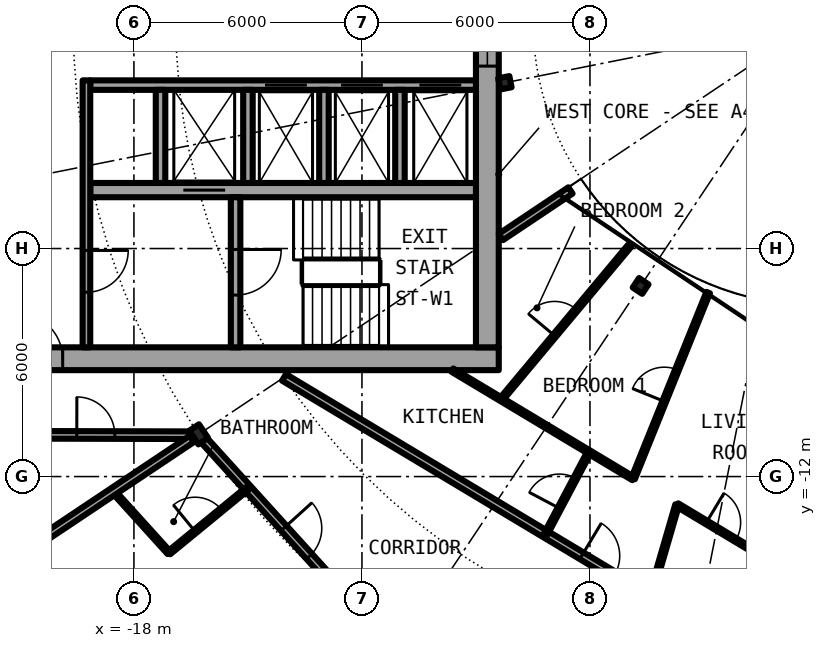
"""IFC4 building model, lengths in metres.
Left out: names, types, materials, properties, quantities, classifications, styles, units other than length and angle.
Written with IfcOpenShell. Run it as: python <this file> out.ifc"""

import sys

from ifc_helpers import new_model, si_unit, direction, frame, frame_2d, origin, origin_2d, place, context, subcontext, project, spatial, rectangle, i_section, extrude, element, fill, save


model = new_model("IFC4")
c1 = context("Model", 3, precision=1e-05, world=origin(), true_north=direction((0.0, 1.0)))
c2 = subcontext(c1, "Body", "Model", "MODEL_VIEW")
j1 = project(units=[si_unit("LENGTHUNIT", "METRE"), si_unit("PLANEANGLEUNIT", "RADIAN")], contexts=[c1])
p1 = place(None, origin())
s1 = spatial("IfcSite", under=j1, at=p1, CompositionType="ELEMENT")
p2 = place(p1, origin())
s2 = spatial("IfcBuilding", under=s1, at=p2, CompositionType="ELEMENT")
p3 = place(p2, frame((0.0, 0.0, 117.75)))
s3 = spatial("IfcBuildingStorey", under=s2, at=p3, CompositionType="ELEMENT", Elevation=117.75)
p4 = place(p3, frame((-16.297, -10.889, 0.0), z_axis=(0.0, 0.0, 1.0), x_axis=(-0.831469612303, -0.55557023302, 0.0)))
e1 = element("IfcColumn", 1, at=p4, inside=s3, PredefinedType="COLUMN", context=c2, shape_type="SweptSolid", body=[
    extrude(i_section(OverallWidth=0.307, OverallDepth=0.432, WebThickness=0.021, FlangeThickness=0.04, FilletRadius=0.027, at=origin_2d()), origin(), (0.0, 0.0, 1.0), 3.05),
])
for number, where, z_axis, x_axis in (
    (2, (-8.239, -1.639, 0.0), (0.0, 0.0, 1.0), (-0.981, -0.195, 0.0)),
    (3, (-4.667, -6.984, 0.0), (0.0, 0.0, 1.0), (-0.556, -0.831, 0.0)),
):
    element("IfcColumn", number, at=place(p3, frame(where, z_axis=z_axis, x_axis=x_axis)), inside=s3, PredefinedType="COLUMN", context=c2, shape_type="SweptSolid", body=[
        extrude(i_section(OverallWidth=0.3, OverallDepth=0.3, WebThickness=0.011, FlangeThickness=0.019, FilletRadius=0.027, at=origin_2d()), origin(), (0.0, 0.0, 1.0), 3.05),
    ])
p5 = place(p3, frame((-22.2, -8.9, 0.0), z_axis=(0.0, 0.0, 1.0), x_axis=(1.0, 0.0, 0.0)))
e4 = element("IfcWall", 4, at=p5, inside=s3, PredefinedType="SHEAR", context=c2, shape_type="SweptSolid", body=[
    extrude(rectangle(XDim=13.8, YDim=0.6, at=frame_2d((6.9, 0.0))), origin(), (0.0, 0.0, 1.0), 3.05),
])
p6 = place(p5, frame((1.125, 0.0, 0.0)))
e5 = element("IfcOpeningElement", 5, at=p6, cuts=e4, PredefinedType="OPENING", context=c2, shape_type="SweptSolid", body=[
    extrude(rectangle(XDim=1.2, YDim=2.3, at=frame_2d((0.6, 1.15))), frame((0.0, 0.31, 0.0), z_axis=(0.0, -1.0, 0.0), x_axis=(1.0, 0.0, 0.0)), (0.0, 0.0, 1.0), 0.62),
])
p7 = place(p3, frame((-8.7, 8.6, 0.0), z_axis=(0.0, 0.0, 1.0), x_axis=(0.0, -1.0, 0.0)))
e6 = element("IfcWall", 6, at=p7, inside=s3, PredefinedType="SHEAR", context=c2, shape_type="SweptSolid", body=[
    extrude(rectangle(XDim=17.2, YDim=0.6, at=frame_2d((8.6, 0.0))), origin(), (0.0, 0.0, 1.0), 3.05),
])
p8 = place(p7, frame((7.4, 0.0, 0.1)))
e7 = element("IfcOpeningElement", 7, at=p8, cuts=e6, PredefinedType="OPENING", context=c2, shape_type="SweptSolid", body=[
    extrude(rectangle(XDim=2.4, YDim=2.2, at=frame_2d((1.2, 1.1))), frame((0.0, 0.31, 0.0), z_axis=(0.0, -1.0, 0.0), x_axis=(1.0, 0.0, 0.0)), (0.0, 0.0, 1.0), 0.62),
])
p9 = place(p3, frame((-9.0, -1.7, 0.0), z_axis=(0.0, 0.0, 1.0), x_axis=(-1.0, 0.0, 0.0)))
e8 = element("IfcWall", 8, at=p9, inside=s3, PredefinedType="SHEAR", context=c2, shape_type="SweptSolid", body=[
    extrude(rectangle(XDim=10.15, YDim=0.25, at=frame_2d((5.075, 0.0))), origin(), (0.0, 0.0, 1.0), 3.05),
])
p10 = place(p9, frame((0.387, 0.0, 0.0)))
e9 = element("IfcOpeningElement", 9, at=p10, cuts=e8, PredefinedType="OPENING", context=c2, shape_type="SweptSolid", body=[
    extrude(rectangle(XDim=1.1, YDim=2.3, at=frame_2d((0.55, 1.15))), frame((0.0, 0.135, 0.0), z_axis=(0.0, -1.0, 0.0), x_axis=(1.0, 0.0, 0.0)), (0.0, 0.0, 1.0), 0.27),
])
p11 = place(p9, frame((2.45, 0.0, 0.0)))
e10 = element("IfcOpeningElement", 10, at=p11, cuts=e8, PredefinedType="OPENING", context=c2, shape_type="SweptSolid", body=[
    extrude(rectangle(XDim=1.1, YDim=2.3, at=frame_2d((0.55, 1.15))), frame((0.0, 0.135, 0.0), z_axis=(0.0, -1.0, 0.0), x_axis=(1.0, 0.0, 0.0)), (0.0, 0.0, 1.0), 0.27),
])
p12 = place(p9, frame((4.45, 0.0, 0.0)))
e11 = element("IfcOpeningElement", 11, at=p12, cuts=e8, PredefinedType="OPENING", context=c2, shape_type="SweptSolid", body=[
    extrude(rectangle(XDim=1.1, YDim=2.3, at=frame_2d((0.55, 1.15))), frame((0.0, 0.135, 0.0), z_axis=(0.0, -1.0, 0.0), x_axis=(1.0, 0.0, 0.0)), (0.0, 0.0, 1.0), 0.27),
])
p13 = place(p3, frame((-9.0, -4.462, 0.0), z_axis=(0.0, 0.0, 1.0), x_axis=(-1.0, 0.0, 0.0)))
e12 = element("IfcWall", 12, at=p13, inside=s3, PredefinedType="SHEAR", context=c2, shape_type="SweptSolid", body=[
    extrude(rectangle(XDim=10.15, YDim=0.375, at=frame_2d((5.075, 0.0))), origin(), (0.0, 0.0, 1.0), 3.05),
])
p14 = place(p13, frame((6.6, 0.0, 0.0)))
e13 = element("IfcOpeningElement", 13, at=p14, cuts=e12, PredefinedType="OPENING", context=c2, shape_type="SweptSolid", body=[
    extrude(rectangle(XDim=1.1, YDim=2.3, at=frame_2d((0.55, 1.15))), frame((0.0, 0.198, 0.0), z_axis=(0.0, -1.0, 0.0), x_axis=(1.0, 0.0, 0.0)), (0.0, 0.0, 1.0), 0.395),
])
p15 = place(p3, frame((-15.325, -4.65, 0.0), z_axis=(0.0, 0.0, 1.0), x_axis=(0.0, -1.0, 0.0)))
e14 = element("IfcWall", 14, at=p15, inside=s3, PredefinedType="SHEAR", context=c2, shape_type="SweptSolid", body=[
    extrude(rectangle(XDim=3.95, YDim=0.25, at=frame_2d((1.975, 0.0))), origin(), (0.0, 0.0, 1.0), 3.05),
])
p16 = place(p15, frame((1.375, 0.0, 0.0)))
e15 = element("IfcOpeningElement", 15, at=p16, cuts=e14, PredefinedType="OPENING", context=c2, shape_type="SweptSolid", body=[
    extrude(rectangle(XDim=1.2, YDim=2.3, at=frame_2d((0.6, 1.15))), frame((0.0, 0.135, 0.0), z_axis=(0.0, -1.0, 0.0), x_axis=(1.0, 0.0, 0.0)), (0.0, 0.0, 1.0), 0.27),
])
for number, where, z_axis, x_axis in (
    (16, (-15.0, -1.825, 0.0), (0.0, 0.0, 1.0), (0.0, -1.0, 0.0)),
    (17, (-17.3, -1.825, 0.0), (0.0, 0.0, 1.0), (0.0, -1.0, 0.0)),
):
    element("IfcWall", number, at=place(p3, frame(where, z_axis=z_axis, x_axis=x_axis)), inside=s3, PredefinedType="SOLIDWALL", context=c2, shape_type="SweptSolid", body=[
        extrude(rectangle(XDim=2.45, YDim=0.25, at=frame_2d((1.225, 0.0))), origin(), (0.0, 0.0, 1.0), 2.7),
    ])
p17 = place(p3, frame((-19.25, -1.575, 0.0), z_axis=(0.0, 0.0, 1.0), x_axis=(0.0, -1.0, 0.0)))
e18 = element("IfcWall", 18, at=p17, inside=s3, PredefinedType="SOLIDWALL", context=c2, shape_type="SweptSolid", body=[
    extrude(rectangle(XDim=7.025, YDim=0.2, at=frame_2d((3.513, 0.0))), origin(), (0.0, 0.0, 1.0), 2.7),
])
p18 = place(p17, frame((4.475, 0.0, 0.0)))
e19 = element("IfcOpeningElement", 19, at=p18, cuts=e18, PredefinedType="OPENING", context=c2, shape_type="SweptSolid", body=[
    extrude(rectangle(XDim=1.1, YDim=2.3, at=frame_2d((0.55, 1.15))), frame((0.0, 0.11, 0.0), z_axis=(0.0, -1.0, 0.0), x_axis=(1.0, 0.0, 0.0)), (0.0, 0.0, 1.0), 0.22),
])
for number, where, z_axis, x_axis in (
    (20, (-11.0, -1.825, 0.0), (0.0, 0.0, 1.0), (0.0, -1.0, 0.0)),
    (21, (-13.0, -1.825, 0.0), (0.0, 0.0, 1.0), (0.0, -1.0, 0.0)),
):
    element("IfcWall", number, at=place(p3, frame(where, z_axis=z_axis, x_axis=x_axis)), inside=s3, PredefinedType="SOLIDWALL", context=c2, shape_type="SweptSolid", body=[
        extrude(rectangle(XDim=2.45, YDim=0.25, at=frame_2d((1.225, 0.0))), origin(), (0.0, 0.0, 1.0), 2.7),
    ])
p19 = place(p3, frame((-18.542, -12.389, 0.0), z_axis=(0.0, 0.0, 1.0), x_axis=(0.671396556615, -0.741098282123, 0.0)))
e22 = element("IfcWall", 22, at=p19, inside=s3, PredefinedType="PARTITIONING", context=c2, shape_type="SweptSolid", body=[
    extrude(rectangle(XDim=2.182, YDim=0.1, at=frame_2d((1.091, 0.0))), origin(), (0.0, 0.0, 1.0), 2.7),
])
p20 = place(p3, frame((-16.192, -11.004, 0.0), z_axis=(0.0, 0.0, 1.0), x_axis=(0.671481997275, -0.741020868354, 0.0)))
e23 = element("IfcWall", 23, at=p20, inside=s3, PredefinedType="PARTITIONING", context=c2, shape_type="SweptSolid", body=[
    extrude(rectangle(XDim=5.596, YDim=0.2, at=frame_2d((2.798, 0.0))), origin(), (0.0, 0.0, 1.0), 2.39),
])
p21 = place(p20, frame((3.179, 0.0, 0.0)))
e24 = element("IfcOpeningElement", 24, at=p21, cuts=e23, PredefinedType="OPENING", context=c2, shape_type="SweptSolid", body=[
    extrude(rectangle(XDim=1.0, YDim=2.3, at=frame_2d((0.5, 1.15))), frame((0.0, 0.11, 0.0), z_axis=(0.0, -1.0, 0.0), x_axis=(1.0, 0.0, 0.0)), (0.0, 0.0, 1.0), 0.22),
])
p22 = place(p3, frame((-14.051, -9.391, 0.0), z_axis=(0.0, 0.0, 1.0), x_axis=(0.857768591583, -0.514036033069, 0.0)))
e25 = element("IfcWall", 25, at=p22, inside=s3, PredefinedType="PARTITIONING", context=c2, shape_type="SweptSolid", body=[
    extrude(rectangle(XDim=14.45, YDim=0.2, at=frame_2d((7.225, 0.0))), origin(), (0.0, 0.0, 1.0), 2.7),
])
p23 = place(p22, frame((9.133, 0.0, 0.0)))
e26 = element("IfcOpeningElement", 26, at=p23, cuts=e25, PredefinedType="OPENING", context=c2, shape_type="SweptSolid", body=[
    extrude(rectangle(XDim=1.0, YDim=2.3, at=frame_2d((0.5, 1.15))), frame((0.0, 0.11, 0.0), z_axis=(0.0, -1.0, 0.0), x_axis=(1.0, 0.0, 0.0)), (0.0, 0.0, 1.0), 0.22),
])
p24 = place(p3, frame((-9.621, -9.199, 0.0), z_axis=(0.0, 0.0, 1.0), x_axis=(0.857698539053, -0.514152911211, 0.0)))
e27 = element("IfcWall", 27, at=p24, inside=s3, PredefinedType="PARTITIONING", context=c2, shape_type="SweptSolid", body=[
    extrude(rectangle(XDim=5.551, YDim=0.1, at=frame_2d((2.775, 0.0))), origin(), (0.0, 0.0, 1.0), 2.7),
])
p25 = place(p3, frame((-3.702, -12.747, 0.0), z_axis=(0.0, 0.0, 1.0), x_axis=(0.85772440305, -0.514109763001, 0.0)))
e28 = element("IfcWall", 28, at=p25, inside=s3, PredefinedType="PARTITIONING", context=c2, shape_type="SweptSolid", body=[
    extrude(rectangle(XDim=2.698, YDim=0.1, at=frame_2d((1.349, 0.0))), origin(), (0.0, 0.0, 1.0), 2.7),
])
p26 = place(p25, frame((0.894, 0.0, 0.0)))
e29 = element("IfcOpeningElement", 29, at=p26, cuts=e28, PredefinedType="OPENING", context=c2, shape_type="SweptSolid", body=[
    extrude(rectangle(XDim=0.9, YDim=2.3, at=frame_2d((0.45, 1.15))), frame((0.0, 0.06, 0.0), z_axis=(0.0, -1.0, 0.0), x_axis=(1.0, 0.0, 0.0)), (0.0, 0.0, 1.0), 0.12),
])
p27 = place(p3, frame((-21.675, -10.9, 0.0), z_axis=(0.0, 0.0, 1.0), x_axis=(0.999997173357, -0.002377662213, 0.0)))
e30 = element("IfcWall", 30, at=p27, inside=s3, PredefinedType="PARTITIONING", context=c2, shape_type="SweptSolid", body=[
    extrude(rectangle(XDim=5.134, YDim=0.2, at=frame_2d((2.567, 0.0))), origin(), (0.0, 0.0, 1.0), 2.7),
])
p28 = place(p27, frame((2.171, 0.0, 0.0)))
e31 = element("IfcOpeningElement", 31, at=p28, cuts=e30, PredefinedType="OPENING", context=c2, shape_type="SweptSolid", body=[
    extrude(rectangle(XDim=1.0, YDim=2.3, at=frame_2d((0.5, 1.15))), frame((0.0, 0.11, 0.0), z_axis=(0.0, -1.0, 0.0), x_axis=(1.0, 0.0, 0.0)), (0.0, 0.0, 1.0), 0.22),
])
p29 = place(p3, frame((-6.513, -4.472, 0.0), z_axis=(0.0, 0.0, 1.0), x_axis=(-0.831333375071, -0.555774072347, 0.0)))
e32 = element("IfcWall", 32, at=p29, inside=s3, PredefinedType="PARTITIONING", context=c2, shape_type="SweptSolid", body=[
    extrude(rectangle(XDim=2.203, YDim=0.2, at=frame_2d((1.101, 0.0))), origin(), (0.0, 0.0, 1.0), 2.7),
])
p30 = place(p3, frame((-22.595, -15.097, 0.0), z_axis=(0.0, 0.0, 1.0), x_axis=(0.831467903109, 0.555572791, 0.0)))
e33 = element("IfcWall", 33, at=p30, inside=s3, PredefinedType="PARTITIONING", context=c2, shape_type="SweptSolid", body=[
    extrude(rectangle(XDim=7.358, YDim=0.2, at=frame_2d((3.679, 0.0))), origin(), (0.0, 0.0, 1.0), 2.7),
])
p31 = place(p3, frame((-17.077, -14.006, 0.0), z_axis=(0.0, 0.0, 1.0), x_axis=(0.77319617123, 0.634166918717, 0.0)))
e34 = element("IfcWall", 34, at=p31, inside=s3, PredefinedType="PARTITIONING", context=c2, shape_type="SweptSolid", body=[
    extrude(rectangle(XDim=2.675, YDim=0.1, at=frame_2d((1.337, 0.0))), origin(), (0.0, 0.0, 1.0), 2.7),
])
p32 = place(p31, frame((0.887, 0.0, 0.0)))
e35 = element("IfcOpeningElement", 35, at=p32, cuts=e34, PredefinedType="OPENING", context=c2, shape_type="SweptSolid", body=[
    extrude(rectangle(XDim=0.9, YDim=2.3, at=frame_2d((0.45, 1.15))), frame((0.0, 0.06, 0.0), z_axis=(0.0, -1.0, 0.0), x_axis=(1.0, 0.0, 0.0)), (0.0, 0.0, 1.0), 0.12),
])
p33 = place(p3, frame((-8.335, -9.97, 0.0), z_axis=(0.0, 0.0, 1.0), x_axis=(0.641376424834, 0.767226356213, 0.0)))
e36 = element("IfcWall", 36, at=p33, inside=s3, PredefinedType="PARTITIONING", context=c2, shape_type="SweptSolid", body=[
    extrude(rectangle(XDim=5.275, YDim=0.1, at=frame_2d((2.637, 0.0))), origin(), (0.0, 0.0, 1.0), 2.7),
])
p34 = place(p33, frame((2.187, 0.0, 0.0)))
e37 = element("IfcOpeningElement", 37, at=p34, cuts=e36, PredefinedType="OPENING", context=c2, shape_type="SweptSolid", body=[
    extrude(rectangle(XDim=0.9, YDim=2.3, at=frame_2d((0.45, 1.15))), frame((0.0, 0.06, 0.0), z_axis=(0.0, -1.0, 0.0), x_axis=(1.0, 0.0, 0.0)), (0.0, 0.0, 1.0), 0.12),
])
p35 = place(p3, frame((-7.166, -13.517, 0.0), z_axis=(0.0, 0.0, 1.0), x_axis=(0.468337293896, 0.883549760425, 0.0)))
e38 = element("IfcWall", 38, at=p35, inside=s3, PredefinedType="PARTITIONING", context=c2, shape_type="SweptSolid", body=[
    extrude(rectangle(XDim=2.445, YDim=0.1, at=frame_2d((1.222, 0.0))), origin(), (0.0, 0.0, 1.0), 2.7),
])
p36 = place(p35, frame((0.772, 0.0, 0.0)))
e39 = element("IfcOpeningElement", 39, at=p36, cuts=e38, PredefinedType="OPENING", context=c2, shape_type="SweptSolid", body=[
    extrude(rectangle(XDim=0.9, YDim=2.3, at=frame_2d((0.45, 1.15))), frame((0.0, 0.06, 0.0), z_axis=(0.0, -1.0, 0.0), x_axis=(1.0, 0.0, 0.0)), (0.0, 0.0, 1.0), 0.12),
])
p37 = place(p3, frame((-4.864, -12.051, 0.0), z_axis=(0.0, 0.0, 1.0), x_axis=(0.374372761824, 0.927278294367, 0.0)))
e40 = element("IfcWall", 40, at=p37, inside=s3, PredefinedType="PARTITIONING", context=c2, shape_type="SweptSolid", body=[
    extrude(rectangle(XDim=5.276, YDim=0.1, at=frame_2d((2.638, 0.0))), origin(), (0.0, 0.0, 1.0), 2.7),
])
p38 = place(p37, frame((2.188, 0.0, 0.0)))
e41 = element("IfcOpeningElement", 41, at=p38, cuts=e40, PredefinedType="OPENING", context=c2, shape_type="SweptSolid", body=[
    extrude(rectangle(XDim=0.9, YDim=2.3, at=frame_2d((0.45, 1.15))), frame((0.0, 0.06, 0.0), z_axis=(0.0, -1.0, 0.0), x_axis=(1.0, 0.0, 0.0)), (0.0, 0.0, 1.0), 0.12),
])
p39 = place(p3, frame((-4.411, -15.168, 0.0), z_axis=(0.0, 0.0, 1.0), x_axis=(0.279201466266, 0.960232545395, 0.0)))
e42 = element("IfcWall", 42, at=p39, inside=s3, PredefinedType="PARTITIONING", context=c2, shape_type="SweptSolid", body=[
    extrude(rectangle(XDim=2.524, YDim=0.1, at=frame_2d((1.262, 0.0))), origin(), (0.0, 0.0, 1.0), 2.7),
])
p40 = place(p10, origin())
e43 = element("IfcDoor", 43, at=p40, inside=s3, OperationType="DOUBLE_DOOR_SLIDING", PredefinedType="DOOR", context=c2, shape_type="SweptSolid", body=[
    extrude(rectangle(XDim=1.1, YDim=2.3, at=frame_2d((0.55, 1.15))), frame((0.0, 0.025, 0.0), z_axis=(0.0, -1.0, 0.0), x_axis=(1.0, 0.0, 0.0)), (0.0, 0.0, 1.0), 0.05),
])
fill(e9, e43)
p41 = place(p11, origin())
e44 = element("IfcDoor", 44, at=p41, inside=s3, OperationType="DOUBLE_DOOR_SLIDING", PredefinedType="DOOR", context=c2, shape_type="SweptSolid", body=[
    extrude(rectangle(XDim=1.1, YDim=2.3, at=frame_2d((0.55, 1.15))), frame((0.0, 0.025, 0.0), z_axis=(0.0, -1.0, 0.0), x_axis=(1.0, 0.0, 0.0)), (0.0, 0.0, 1.0), 0.05),
])
fill(e10, e44)
p42 = place(p12, origin())
e45 = element("IfcDoor", 45, at=p42, inside=s3, OperationType="DOUBLE_DOOR_SLIDING", PredefinedType="DOOR", context=c2, shape_type="SweptSolid", body=[
    extrude(rectangle(XDim=1.1, YDim=2.3, at=frame_2d((0.55, 1.15))), frame((0.0, 0.025, 0.0), z_axis=(0.0, -1.0, 0.0), x_axis=(1.0, 0.0, 0.0)), (0.0, 0.0, 1.0), 0.05),
])
fill(e11, e45)
p43 = place(p14, origin())
e46 = element("IfcDoor", 46, at=p43, inside=s3, OperationType="DOUBLE_DOOR_SLIDING", PredefinedType="DOOR", context=c2, shape_type="SweptSolid", body=[
    extrude(rectangle(XDim=1.1, YDim=2.3, at=frame_2d((0.55, 1.15))), frame((0.0, 0.025, 0.0), z_axis=(0.0, -1.0, 0.0), x_axis=(1.0, 0.0, 0.0)), (0.0, 0.0, 1.0), 0.05),
])
fill(e13, e46)
p44 = place(p16, origin())
e47 = element("IfcDoor", 47, at=p44, inside=s3, OperationType="SINGLE_SWING_LEFT", PredefinedType="DOOR", context=c2, shape_type="SweptSolid", body=[
    extrude(rectangle(XDim=1.2, YDim=2.3, at=frame_2d((0.6, 1.15))), frame((0.0, 0.025, 0.0), z_axis=(0.0, -1.0, 0.0), x_axis=(1.0, 0.0, 0.0)), (0.0, 0.0, 1.0), 0.05),
])
fill(e15, e47)
p45 = place(p18, origin())
e48 = element("IfcDoor", 48, at=p45, inside=s3, OperationType="SINGLE_SWING_LEFT", PredefinedType="DOOR", context=c2, shape_type="SweptSolid", body=[
    extrude(rectangle(XDim=1.1, YDim=2.3, at=frame_2d((0.55, 1.15))), frame((0.0, 0.025, 0.0), z_axis=(0.0, -1.0, 0.0), x_axis=(1.0, 0.0, 0.0)), (0.0, 0.0, 1.0), 0.05),
])
fill(e19, e48)
p46 = place(p6, origin())
e49 = element("IfcDoor", 49, at=p46, inside=s3, OperationType="SINGLE_SWING_RIGHT", PredefinedType="DOOR", context=c2, shape_type="SweptSolid", body=[
    extrude(rectangle(XDim=1.2, YDim=2.3, at=frame_2d((0.6, 1.15))), frame((0.0, 0.025, 0.0), z_axis=(0.0, -1.0, 0.0), x_axis=(1.0, 0.0, 0.0)), (0.0, 0.0, 1.0), 0.05),
])
fill(e5, e49)
p47 = place(p8, origin())
e50 = element("IfcWindow", 50, at=p47, inside=s3, PartitioningType="SINGLE_PANEL", PredefinedType="WINDOW", context=c2, shape_type="SweptSolid", body=[
    extrude(rectangle(XDim=2.4, YDim=2.2, at=frame_2d((1.2, 1.1))), frame((0.0, 0.03, 0.0), z_axis=(0.0, -1.0, 0.0), x_axis=(1.0, 0.0, 0.0)), (0.0, 0.0, 1.0), 0.06),
])
fill(e7, e50)
p48 = place(p21, origin())
e51 = element("IfcDoor", 51, at=p48, inside=s3, OperationType="SINGLE_SWING_RIGHT", PredefinedType="DOOR", context=c2, shape_type="SweptSolid", body=[
    extrude(rectangle(XDim=1.0, YDim=2.3, at=frame_2d((0.5, 1.15))), frame((0.0, 0.025, 0.0), z_axis=(0.0, -1.0, 0.0), x_axis=(1.0, 0.0, 0.0)), (0.0, 0.0, 1.0), 0.05),
])
fill(e24, e51)
p49 = place(p32, origin())
e52 = element("IfcDoor", 52, at=p49, inside=s3, OperationType="SINGLE_SWING_LEFT", PredefinedType="DOOR", context=c2, shape_type="SweptSolid", body=[
    extrude(rectangle(XDim=0.9, YDim=2.3, at=frame_2d((0.45, 1.15))), frame((0.0, 0.025, 0.0), z_axis=(0.0, -1.0, 0.0), x_axis=(1.0, 0.0, 0.0)), (0.0, 0.0, 1.0), 0.05),
])
fill(e35, e52)
p50 = place(p23, origin())
e53 = element("IfcDoor", 53, at=p50, inside=s3, OperationType="SINGLE_SWING_RIGHT", PredefinedType="DOOR", context=c2, shape_type="SweptSolid", body=[
    extrude(rectangle(XDim=1.0, YDim=2.3, at=frame_2d((0.5, 1.15))), frame((0.0, 0.025, 0.0), z_axis=(0.0, -1.0, 0.0), x_axis=(1.0, 0.0, 0.0)), (0.0, 0.0, 1.0), 0.05),
])
fill(e26, e53)
p51 = place(p26, origin())
e54 = element("IfcDoor", 54, at=p51, inside=s3, OperationType="SINGLE_SWING_LEFT", PredefinedType="DOOR", context=c2, shape_type="SweptSolid", body=[
    extrude(rectangle(XDim=0.9, YDim=2.3, at=frame_2d((0.45, 1.15))), frame((0.0, 0.025, 0.0), z_axis=(0.0, -1.0, 0.0), x_axis=(1.0, 0.0, 0.0)), (0.0, 0.0, 1.0), 0.05),
])
fill(e29, e54)
p52 = place(p36, origin())
e55 = element("IfcDoor", 55, at=p52, inside=s3, OperationType="SINGLE_SWING_LEFT", PredefinedType="DOOR", context=c2, shape_type="SweptSolid", body=[
    extrude(rectangle(XDim=0.9, YDim=2.3, at=frame_2d((0.45, 1.15))), frame((0.0, 0.025, 0.0), z_axis=(0.0, -1.0, 0.0), x_axis=(1.0, 0.0, 0.0)), (0.0, 0.0, 1.0), 0.05),
])
fill(e39, e55)
p53 = place(p38, origin())
e56 = element("IfcDoor", 56, at=p53, inside=s3, OperationType="SINGLE_SWING_RIGHT", PredefinedType="DOOR", context=c2, shape_type="SweptSolid", body=[
    extrude(rectangle(XDim=0.9, YDim=2.3, at=frame_2d((0.45, 1.15))), frame((0.0, 0.025, 0.0), z_axis=(0.0, -1.0, 0.0), x_axis=(1.0, 0.0, 0.0)), (0.0, 0.0, 1.0), 0.05),
])
fill(e41, e56)
p54 = place(p34, origin())
e57 = element("IfcDoor", 57, at=p54, inside=s3, OperationType="SINGLE_SWING_RIGHT", PredefinedType="DOOR", context=c2, shape_type="SweptSolid", body=[
    extrude(rectangle(XDim=0.9, YDim=2.3, at=frame_2d((0.45, 1.15))), frame((0.0, 0.025, 0.0), z_axis=(0.0, -1.0, 0.0), x_axis=(1.0, 0.0, 0.0)), (0.0, 0.0, 1.0), 0.05),
])
fill(e37, e57)
p55 = place(p28, origin())
e58 = element("IfcDoor", 58, at=p55, inside=s3, OperationType="SINGLE_SWING_RIGHT", PredefinedType="DOOR", context=c2, shape_type="SweptSolid", body=[
    extrude(rectangle(XDim=1.0, YDim=2.3, at=frame_2d((0.5, 1.15))), frame((0.0, 0.025, 0.0), z_axis=(0.0, -1.0, 0.0), x_axis=(1.0, 0.0, 0.0)), (0.0, 0.0, 1.0), 0.05),
])
fill(e31, e58)
save(model, sys.argv[1])
